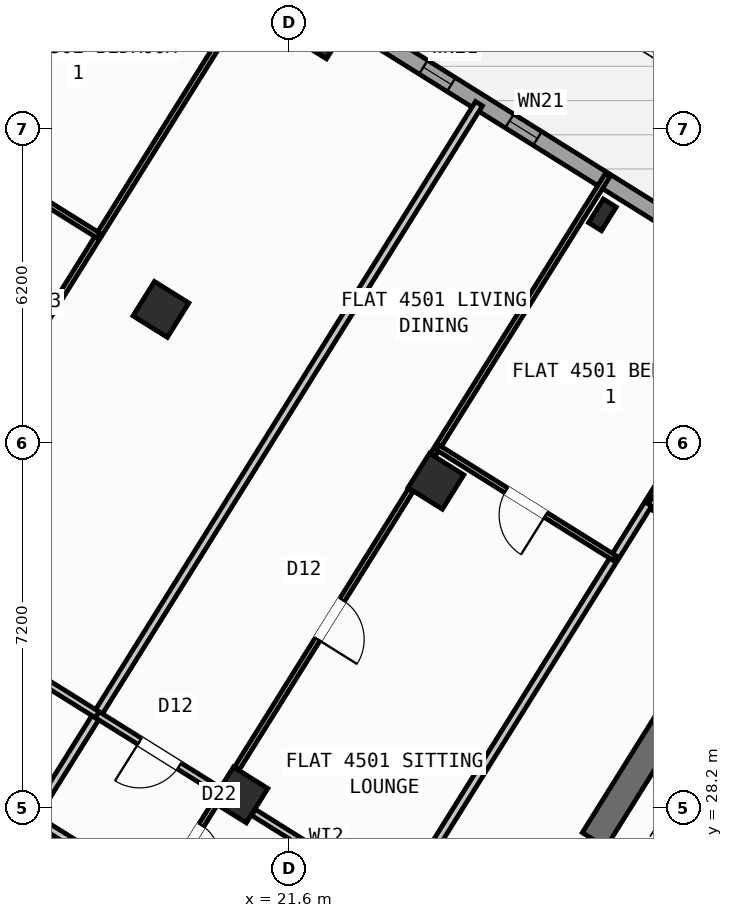
"""IFC4 building model, lengths in metres.
Left out: names, types, materials, properties, quantities, classifications, styles, units other than length and angle.
Written with IfcOpenShell. Run it as: python <this file> out.ifc"""

import sys

from ifc_helpers import new_model, si_unit, direction, frame, frame_2d, origin, origin_2d, place, context, subcontext, project, spatial, rectangle, hollow_rectangle, i_section, extrude, source, transform, mapped, element, fill, save


model = new_model("IFC4")
c1 = context("Model", 3, precision=1e-05, world=origin(), true_north=direction((0.0, 1.0)))
c2 = subcontext(c1, "Body", "Model", "MODEL_VIEW")
j1 = project(units=[si_unit("LENGTHUNIT", "METRE"), si_unit("PLANEANGLEUNIT", "RADIAN")], contexts=[c1])
p1 = place(None, origin())
s1 = spatial("IfcSite", under=j1, at=p1, CompositionType="ELEMENT")
p2 = place(p1, origin())
s2 = spatial("IfcBuilding", under=s1, at=p2, CompositionType="ELEMENT")
p3 = place(p2, frame((0.0, 0.0, 179.4)))
s3 = spatial("IfcBuildingStorey", under=s2, at=p3, CompositionType="ELEMENT", Elevation=179.4)
p4 = place(p3, frame((29.517, 30.594, 0.0), z_axis=(0.0, 0.0, 1.0), x_axis=(-0.529906864564, -0.848055844204, 0.0)))
e1 = element("IfcWall", 1, at=p4, inside=s3, PredefinedType="SHEAR", context=c2, shape_type="SweptSolid", body=[
    extrude(rectangle(XDim=3.575, YDim=0.55, at=frame_2d((1.788, 0.0))), origin(), (0.0, 0.0, 1.0), 4.55),
])
m1 = source(origin(), c2, "Body", "SweptSolid", [
    extrude(i_section(OverallWidth=0.3, OverallDepth=0.55, WebThickness=0.015, FlangeThickness=0.029, at=origin_2d()), origin(), (0.0, 0.0, 1.0), 4.8),
])
p5 = place(p3, frame((27.786, 39.901, 0.0), z_axis=(0.0, 0.0, 1.0), x_axis=(-0.848048096156, 0.529919264233, 0.0)))
e2 = element("IfcColumn", 2, at=p5, inside=s3, PredefinedType="COLUMN", context=c2, shape_type="MappedRepresentation", body=[
    mapped(m1, transform((0.0, 0.0, 0.0), scale=1.0)),
])
m2 = source(origin(), c2, "Body", "SweptSolid", [
    extrude(hollow_rectangle(XDim=0.8, YDim=0.8, WallThickness=0.032, at=origin_2d()), origin(), (0.0, 0.0, 1.0), 4.8),
])
for number, where, z_axis, x_axis in (
    (3, (24.5, 34.643, 0.0), (0.0, 0.0, 1.0), (-0.848, 0.53, 0.0)),
    (4, (20.632, 28.452, 0.0), (0.0, 0.0, 1.0), (-0.848, 0.53, 0.0)),
):
    element("IfcColumn", number, at=place(p3, frame(where, z_axis=z_axis, x_axis=x_axis)), inside=s3, PredefinedType="COLUMN", context=c2, shape_type="MappedRepresentation", body=[
        mapped(m2, transform((0.0, 0.0, 0.0), scale=1.0)),
    ])
p6 = place(p3, frame((22.358, 43.292, 0.0), z_axis=(0.0, 0.0, 1.0), x_axis=(-0.848048096156, 0.529919264233, 0.0)))
e5 = element("IfcColumn", 5, at=p6, inside=s3, PredefinedType="COLUMN", context=c2, shape_type="MappedRepresentation", body=[
    mapped(m1, transform((0.0, 0.0, 0.0), scale=1.0)),
])
p7 = place(p3, frame((19.073, 38.034, 0.0), z_axis=(0.0, 0.0, 1.0), x_axis=(-0.848048096156, 0.529919264233, 0.0)))
e6 = element("IfcColumn", 6, at=p7, inside=s3, PredefinedType="COLUMN", context=c2, shape_type="MappedRepresentation", body=[
    mapped(m2, transform((0.0, 0.0, 0.0), scale=1.0)),
])
p8 = place(p3, frame((31.76, 12.183, 0.0), z_axis=(0.0, 0.0, 1.0), x_axis=(-0.848047074256, 0.529920899612, 0.0)))
e7 = element("IfcWall", 7, at=p8, inside=s3, PredefinedType="STANDARD", context=c2, shape_type="SweptSolid", body=[
    extrude(rectangle(XDim=30.652, YDim=0.32, at=frame_2d((15.326, 0.0))), origin(), (0.0, 0.0, 1.0), 4.55),
])
p9 = place(p8, frame((21.52, 0.0, 0.0)))
e8 = element("IfcOpeningElement", 8, at=p9, cuts=e7, PredefinedType="OPENING", context=c2, shape_type="SweptSolid", body=[
    extrude(rectangle(XDim=1.2, YDim=2.15, at=frame_2d((0.6, 1.075))), frame((0.0, 0.17, 0.0), z_axis=(0.0, -1.0, 0.0), x_axis=(1.0, 0.0, 0.0)), (0.0, 0.0, 1.0), 0.34),
])
p10 = place(p8, frame((14.878, 0.0, 0.0)))
e9 = element("IfcOpeningElement", 9, at=p10, cuts=e7, PredefinedType="OPENING", context=c2, shape_type="SweptSolid", body=[
    extrude(rectangle(XDim=1.5, YDim=2.25, at=frame_2d((0.75, 1.125))), frame((0.0, 0.17, 0.0), z_axis=(0.0, -1.0, 0.0), x_axis=(1.0, 0.0, 0.0)), (0.0, 0.0, 1.0), 0.34),
])
p11 = place(p8, frame((1.865, 0.0, 0.75)))
e10 = element("IfcOpeningElement", 10, at=p11, cuts=e7, PredefinedType="OPENING", context=c2, shape_type="SweptSolid", body=[
    extrude(rectangle(XDim=2.4, YDim=1.6, at=frame_2d((1.2, 0.8))), frame((0.0, 0.17, 0.0), z_axis=(0.0, -1.0, 0.0), x_axis=(1.0, 0.0, 0.0)), (0.0, 0.0, 1.0), 0.34),
])
p12 = place(p8, frame((7.094, 0.0, 0.75)))
e11 = element("IfcOpeningElement", 11, at=p12, cuts=e7, PredefinedType="OPENING", context=c2, shape_type="SweptSolid", body=[
    extrude(rectangle(XDim=2.4, YDim=1.6, at=frame_2d((1.2, 0.8))), frame((0.0, 0.17, 0.0), z_axis=(0.0, -1.0, 0.0), x_axis=(1.0, 0.0, 0.0)), (0.0, 0.0, 1.0), 0.34),
])
p13 = place(p8, frame((19.404, 0.0, 0.95)))
e12 = element("IfcOpeningElement", 12, at=p13, cuts=e7, PredefinedType="OPENING", context=c2, shape_type="SweptSolid", body=[
    extrude(rectangle(XDim=1.2, YDim=1.4, at=frame_2d((0.6, 0.7))), frame((0.0, 0.17, 0.0), z_axis=(0.0, -1.0, 0.0), x_axis=(1.0, 0.0, 0.0)), (0.0, 0.0, 1.0), 0.34),
])
p14 = place(p8, frame((26.458, 0.0, 0.75)))
e13 = element("IfcOpeningElement", 13, at=p14, cuts=e7, PredefinedType="OPENING", context=c2, shape_type="SweptSolid", body=[
    extrude(rectangle(XDim=2.4, YDim=1.6, at=frame_2d((1.2, 0.8))), frame((0.0, 0.17, 0.0), z_axis=(0.0, -1.0, 0.0), x_axis=(1.0, 0.0, 0.0)), (0.0, 0.0, 1.0), 0.34),
])
p15 = place(p3, frame((5.7, 28.71, 0.0), z_axis=(0.0, 0.0, 1.0), x_axis=(0.529923711467, 0.8480453172, 0.0)))
e14 = element("IfcWall", 14, at=p15, inside=s3, PredefinedType="STANDARD", context=c2, shape_type="SweptSolid", body=[
    extrude(rectangle(XDim=21.587, YDim=0.32, at=frame_2d((10.794, 0.0))), origin(), (0.0, 0.0, 1.0), 4.025),
])
p16 = place(p15, frame((10.127, 0.0, 0.75)))
e15 = element("IfcOpeningElement", 15, at=p16, cuts=e14, PredefinedType="OPENING", context=c2, shape_type="SweptSolid", body=[
    extrude(rectangle(XDim=2.4, YDim=1.6, at=frame_2d((1.2, 0.8))), frame((0.0, 0.17, 0.0), z_axis=(0.0, -1.0, 0.0), x_axis=(1.0, 0.0, 0.0)), (0.0, 0.0, 1.0), 0.34),
])
p17 = place(p3, frame((17.424, 47.083, 0.0), z_axis=(0.0, 0.0, 1.0), x_axis=(0.848049927979, -0.529916332693, 0.0)))
e16 = element("IfcWall", 16, at=p17, inside=s3, PredefinedType="STANDARD", context=c2, shape_type="SweptSolid", body=[
    extrude(rectangle(XDim=29.223, YDim=0.32, at=frame_2d((14.612, 0.0))), origin(), (0.0, 0.0, 1.0), 4.55),
])
p18 = place(p17, frame((2.745, 0.0, 0.0)))
e17 = element("IfcOpeningElement", 17, at=p18, cuts=e16, PredefinedType="OPENING", context=c2, shape_type="SweptSolid", body=[
    extrude(rectangle(XDim=1.05, YDim=2.15, at=frame_2d((0.525, 1.075))), frame((0.0, 0.17, 0.0), z_axis=(0.0, -1.0, 0.0), x_axis=(1.0, 0.0, 0.0)), (0.0, 0.0, 1.0), 0.34),
])
p19 = place(p17, frame((21.926, 0.0, 0.75)))
e18 = element("IfcOpeningElement", 18, at=p19, cuts=e16, PredefinedType="OPENING", context=c2, shape_type="SweptSolid", body=[
    extrude(rectangle(XDim=2.4, YDim=1.6, at=frame_2d((1.2, 0.8))), frame((0.0, 0.17, 0.0), z_axis=(0.0, -1.0, 0.0), x_axis=(1.0, 0.0, 0.0)), (0.0, 0.0, 1.0), 0.34),
])
p20 = place(p17, frame((26.934, 0.0, 0.95)))
e19 = element("IfcOpeningElement", 19, at=p20, cuts=e16, PredefinedType="OPENING", context=c2, shape_type="SweptSolid", body=[
    extrude(rectangle(XDim=1.2, YDim=1.4, at=frame_2d((0.6, 0.7))), frame((0.0, 0.17, 0.0), z_axis=(0.0, -1.0, 0.0), x_axis=(1.0, 0.0, 0.0)), (0.0, 0.0, 1.0), 0.34),
])
p21 = place(p17, frame((10.057, 0.0, 1.0)))
e20 = element("IfcOpeningElement", 20, at=p21, cuts=e16, PredefinedType="OPENING", context=c2, shape_type="SweptSolid", body=[
    extrude(rectangle(XDim=0.65, YDim=1.15, at=frame_2d((0.325, 0.575))), frame((0.0, 0.17, 0.0), z_axis=(0.0, -1.0, 0.0), x_axis=(1.0, 0.0, 0.0)), (0.0, 0.0, 1.0), 0.34),
])
p22 = place(p17, frame((14.636, 0.0, 1.0)))
e21 = element("IfcOpeningElement", 21, at=p22, cuts=e16, PredefinedType="OPENING", context=c2, shape_type="SweptSolid", body=[
    extrude(rectangle(XDim=0.9, YDim=1.25, at=frame_2d((0.45, 0.625))), frame((0.0, 0.17, 0.0), z_axis=(0.0, -1.0, 0.0), x_axis=(1.0, 0.0, 0.0)), (0.0, 0.0, 1.0), 0.34),
])
p23 = place(p17, frame((8.052, 0.0, 1.0)))
e22 = element("IfcOpeningElement", 22, at=p23, cuts=e16, PredefinedType="OPENING", context=c2, shape_type="SweptSolid", body=[
    extrude(rectangle(XDim=0.65, YDim=1.15, at=frame_2d((0.325, 0.575))), frame((0.0, 0.17, 0.0), z_axis=(0.0, -1.0, 0.0), x_axis=(1.0, 0.0, 0.0)), (0.0, 0.0, 1.0), 0.34),
])
p24 = place(p3, frame((30.914, 32.829, 0.0), z_axis=(0.0, 0.0, 1.0), x_axis=(-0.848008813643, 0.529982124211, 0.0)))
e23 = element("IfcWall", 23, at=p24, inside=s3, PredefinedType="PARTITIONING", context=c2, shape_type="SweptSolid", body=[
    extrude(rectangle(XDim=2.61, YDim=0.16, at=frame_2d((1.305, 0.0))), origin(), (0.0, 0.0, 1.0), 4.54),
])
p25 = place(p3, frame((31.239, 38.274, 0.0), z_axis=(0.0, 0.0, 1.0), x_axis=(-0.529921796515, -0.848046513806, 0.0)))
e24 = element("IfcWall", 24, at=p25, inside=s3, PredefinedType="PARTITIONING", context=c2, shape_type="SweptSolid", body=[
    extrude(rectangle(XDim=16.5, YDim=0.16, at=frame_2d((8.25, 0.0))), origin(), (0.0, 0.0, 1.0), 4.54),
])
p26 = place(p3, frame((22.495, 24.281, 0.0), z_axis=(0.0, 0.0, 1.0), x_axis=(-0.848052408131, 0.529912363569, 0.0)))
e25 = element("IfcWall", 25, at=p26, inside=s3, PredefinedType="PARTITIONING", context=c2, shape_type="SweptSolid", body=[
    extrude(rectangle(XDim=16.73, YDim=0.16, at=frame_2d((8.365, 0.0))), origin(), (0.0, 0.0, 1.0), 4.54),
])
p27 = place(p26, frame((5.068, 0.0, 0.0)))
e26 = element("IfcOpeningElement", 26, at=p27, cuts=e25, PredefinedType="OPENING", context=c2, shape_type="SweptSolid", body=[
    extrude(rectangle(XDim=1.0, YDim=2.1, at=frame_2d((0.5, 1.05))), frame((0.0, 0.09, 0.0), z_axis=(0.0, -1.0, 0.0), x_axis=(1.0, 0.0, 0.0)), (0.0, 0.0, 1.0), 0.18),
])
p28 = place(p26, frame((9.011, 0.0, 0.0)))
e27 = element("IfcOpeningElement", 27, at=p28, cuts=e25, PredefinedType="OPENING", context=c2, shape_type="SweptSolid", body=[
    extrude(rectangle(XDim=1.0, YDim=2.1, at=frame_2d((0.5, 1.05))), frame((0.0, 0.09, 0.0), z_axis=(0.0, -1.0, 0.0), x_axis=(1.0, 0.0, 0.0)), (0.0, 0.0, 1.0), 0.18),
])
p29 = place(p3, frame((21.329, 22.416, 0.0), z_axis=(0.0, 0.0, 1.0), x_axis=(-0.848052408131, 0.529912363569, 0.0)))
e28 = element("IfcWall", 28, at=p29, inside=s3, PredefinedType="PARTITIONING", context=c2, shape_type="SweptSolid", body=[
    extrude(rectangle(XDim=16.73, YDim=0.16, at=frame_2d((8.365, 0.0))), origin(), (0.0, 0.0, 1.0), 4.54),
])
p30 = place(p29, frame((1.505, 0.0, 0.0)))
e29 = element("IfcOpeningElement", 29, at=p30, cuts=e28, PredefinedType="OPENING", context=c2, shape_type="SweptSolid", body=[
    extrude(rectangle(XDim=1.0, YDim=2.1, at=frame_2d((0.5, 1.05))), frame((0.0, 0.09, 0.0), z_axis=(0.0, -1.0, 0.0), x_axis=(1.0, 0.0, 0.0)), (0.0, 0.0, 1.0), 0.18),
])
p31 = place(p29, frame((6.435, 0.0, 0.0)))
e30 = element("IfcOpeningElement", 30, at=p31, cuts=e28, PredefinedType="OPENING", context=c2, shape_type="SweptSolid", body=[
    extrude(rectangle(XDim=1.0, YDim=2.1, at=frame_2d((0.5, 1.05))), frame((0.0, 0.09, 0.0), z_axis=(0.0, -1.0, 0.0), x_axis=(1.0, 0.0, 0.0)), (0.0, 0.0, 1.0), 0.18),
])
p32 = place(p29, frame((12.784, 0.0, 0.0)))
e31 = element("IfcOpeningElement", 31, at=p32, cuts=e28, PredefinedType="OPENING", context=c2, shape_type="SweptSolid", body=[
    extrude(rectangle(XDim=1.0, YDim=2.1, at=frame_2d((0.5, 1.05))), frame((0.0, 0.09, 0.0), z_axis=(0.0, -1.0, 0.0), x_axis=(1.0, 0.0, 0.0)), (0.0, 0.0, 1.0), 0.18),
])
p33 = place(p3, frame((25.351, 42.095, 0.0), z_axis=(0.0, 0.0, 1.0), x_axis=(-0.529926315456, -0.848043690023, 0.0)))
e32 = element("IfcWall", 32, at=p33, inside=s3, PredefinedType="PARTITIONING", context=c2, shape_type="SweptSolid", body=[
    extrude(rectangle(XDim=16.62, YDim=0.16, at=frame_2d((8.31, 0.0))), origin(), (0.0, 0.0, 1.0), 4.54),
])
p34 = place(p3, frame((27.889, 40.685, 0.0), z_axis=(0.0, 0.0, 1.0), x_axis=(-0.529924752708, -0.848044666552, 0.0)))
e33 = element("IfcWall", 33, at=p34, inside=s3, PredefinedType="PARTITIONING", context=c2, shape_type="SweptSolid", body=[
    extrude(rectangle(XDim=6.508, YDim=0.11, at=frame_2d((3.254, 0.0))), origin(), (0.0, 0.0, 1.0), 4.54),
])
p35 = place(p3, frame((24.004, 34.467, 0.0), z_axis=(0.0, 0.0, 1.0), x_axis=(-0.529907440938, -0.848055484057, 0.0)))
e34 = element("IfcWall", 34, at=p35, inside=s3, PredefinedType="PARTITIONING", context=c2, shape_type="SweptSolid", body=[
    extrude(rectangle(XDim=6.476, YDim=0.11, at=frame_2d((3.238, 0.0))), origin(), (0.0, 0.0, 1.0), 4.54),
])
p36 = place(p35, frame((2.552, 0.0, 0.0)))
e35 = element("IfcOpeningElement", 35, at=p36, cuts=e34, PredefinedType="OPENING", context=c2, shape_type="SweptSolid", body=[
    extrude(rectangle(XDim=0.92, YDim=2.08, at=frame_2d((0.46, 1.04))), frame((0.0, 0.065, 0.0), z_axis=(0.0, -1.0, 0.0), x_axis=(1.0, 0.0, 0.0)), (0.0, 0.0, 1.0), 0.13),
])
p37 = place(p3, frame((20.135, 28.277, 0.0), z_axis=(0.0, 0.0, 1.0), x_axis=(-0.529844966244, -0.848094518167, 0.0)))
e36 = element("IfcWall", 36, at=p37, inside=s3, PredefinedType="PARTITIONING", context=c2, shape_type="SweptSolid", body=[
    extrude(rectangle(XDim=2.138, YDim=0.11, at=frame_2d((1.069, 0.0))), origin(), (0.0, 0.0, 1.0), 4.54),
])
p38 = place(p37, frame((0.498, 0.0, 0.0)))
e37 = element("IfcOpeningElement", 37, at=p38, cuts=e36, PredefinedType="OPENING", context=c2, shape_type="SweptSolid", body=[
    extrude(rectangle(XDim=0.78, YDim=2.05, at=frame_2d((0.39, 1.025))), frame((0.0, 0.065, 0.0), z_axis=(0.0, -1.0, 0.0), x_axis=(1.0, 0.0, 0.0)), (0.0, 0.0, 1.0), 0.13),
])
p39 = place(p3, frame((20.203, 28.543, 0.0), z_axis=(0.0, 0.0, 1.0), x_axis=(-0.848066485351, 0.529889834233, 0.0)))
e38 = element("IfcWall", 38, at=p39, inside=s3, PredefinedType="PLUMBINGWALL", context=c2, shape_type="SweptSolid", body=[
    extrude(rectangle(XDim=2.816, YDim=0.14, at=frame_2d((1.408, 0.0))), origin(), (0.0, 0.0, 1.0), 4.025),
])
p40 = place(p39, frame((0.906, 0.0, 0.0)))
e39 = element("IfcOpeningElement", 39, at=p40, cuts=e38, PredefinedType="OPENING", context=c2, shape_type="SweptSolid", body=[
    extrude(rectangle(XDim=0.92, YDim=2.08, at=frame_2d((0.46, 1.04))), frame((0.0, 0.08, 0.0), z_axis=(0.0, -1.0, 0.0), x_axis=(1.0, 0.0, 0.0)), (0.0, 0.0, 1.0), 0.16),
])
p41 = place(p3, frame((23.767, 26.316, 0.0), z_axis=(0.0, 0.0, 1.0), x_axis=(-0.848055143312, 0.529907986259, 0.0)))
e40 = element("IfcWall", 40, at=p41, inside=s3, PredefinedType="PLUMBINGWALL", context=c2, shape_type="SweptSolid", body=[
    extrude(rectangle(XDim=3.378, YDim=0.14, at=frame_2d((1.689, 0.0))), origin(), (0.0, 0.0, 1.0), 4.025),
])
p42 = place(p3, frame((28.023, 33.129, 0.0), z_axis=(0.0, 0.0, 1.0), x_axis=(-0.848051592054, 0.529913669587, 0.0)))
e41 = element("IfcWall", 41, at=p42, inside=s3, PredefinedType="PARTITIONING", context=c2, shape_type="SweptSolid", body=[
    extrude(rectangle(XDim=4.118, YDim=0.11, at=frame_2d((2.059, 0.0))), origin(), (0.0, 0.0, 1.0), 4.54),
])
p43 = place(p42, frame((1.599, 0.0, 0.0)))
e42 = element("IfcOpeningElement", 42, at=p43, cuts=e41, PredefinedType="OPENING", context=c2, shape_type="SweptSolid", body=[
    extrude(rectangle(XDim=0.92, YDim=2.08, at=frame_2d((0.46, 1.04))), frame((0.0, 0.065, 0.0), z_axis=(0.0, -1.0, 0.0), x_axis=(1.0, 0.0, 0.0)), (0.0, 0.0, 1.0), 0.13),
])
p44 = place(p3, frame((21.202, 44.864, 0.0), z_axis=(0.0, 0.0, 1.0), x_axis=(-0.529920421309, -0.848047373134, 0.0)))
e43 = element("IfcWall", 43, at=p44, inside=s3, PredefinedType="PARTITIONING", context=c2, shape_type="SweptSolid", body=[
    extrude(rectangle(XDim=16.77, YDim=0.11, at=frame_2d((8.385, 0.0))), origin(), (0.0, 0.0, 1.0), 4.54),
])
p45 = place(p44, frame((15.13, 0.0, 0.0)))
e44 = element("IfcOpeningElement", 44, at=p45, cuts=e43, PredefinedType="OPENING", context=c2, shape_type="SweptSolid", body=[
    extrude(rectangle(XDim=0.78, YDim=2.05, at=frame_2d((0.39, 1.025))), frame((0.0, 0.065, 0.0), z_axis=(0.0, -1.0, 0.0), x_axis=(1.0, 0.0, 0.0)), (0.0, 0.0, 1.0), 0.13),
])
p46 = place(p44, frame((9.884, 0.0, 0.0)))
e45 = element("IfcOpeningElement", 45, at=p46, cuts=e43, PredefinedType="OPENING", context=c2, shape_type="SweptSolid", body=[
    extrude(rectangle(XDim=0.92, YDim=2.08, at=frame_2d((0.46, 1.04))), frame((0.0, 0.065, 0.0), z_axis=(0.0, -1.0, 0.0), x_axis=(1.0, 0.0, 0.0)), (0.0, 0.0, 1.0), 0.13),
])
p47 = place(p3, frame((17.815, 30.035, 0.0), z_axis=(0.0, 0.0, 1.0), x_axis=(-0.848033088468, 0.529943280798, 0.0)))
e46 = element("IfcWall", 46, at=p47, inside=s3, PredefinedType="PLUMBINGWALL", context=c2, shape_type="SweptSolid", body=[
    extrude(rectangle(XDim=2.76, YDim=0.14, at=frame_2d((1.38, 0.0))), origin(), (0.0, 0.0, 1.0), 4.025),
])
p48 = place(p47, frame((1.333, 0.0, 0.0)))
e47 = element("IfcOpeningElement", 47, at=p48, cuts=e46, PredefinedType="OPENING", context=c2, shape_type="SweptSolid", body=[
    extrude(rectangle(XDim=0.92, YDim=2.08, at=frame_2d((0.46, 1.04))), frame((0.0, 0.08, 0.0), z_axis=(0.0, -1.0, 0.0), x_axis=(1.0, 0.0, 0.0)), (0.0, 0.0, 1.0), 0.16),
])
p49 = place(p3, frame((17.844, 39.49, 0.0), z_axis=(0.0, 0.0, 1.0), x_axis=(-0.848042018142, 0.529928990966, 0.0)))
e48 = element("IfcWall", 48, at=p49, inside=s3, PredefinedType="PARTITIONING", context=c2, shape_type="SweptSolid", body=[
    extrude(rectangle(XDim=4.706, YDim=0.11, at=frame_2d((2.353, 0.0))), origin(), (0.0, 0.0, 1.0), 4.54),
])
p50 = place(p49, frame((1.893, 0.0, 0.0)))
e49 = element("IfcOpeningElement", 49, at=p50, cuts=e48, PredefinedType="OPENING", context=c2, shape_type="SweptSolid", body=[
    extrude(rectangle(XDim=0.92, YDim=2.08, at=frame_2d((0.46, 1.04))), frame((0.0, 0.065, 0.0), z_axis=(0.0, -1.0, 0.0), x_axis=(1.0, 0.0, 0.0)), (0.0, 0.0, 1.0), 0.13),
])
p51 = place(p3, frame((41.936, 26.012, 0.0), z_axis=(0.0, 0.0, 1.0), x_axis=(-0.848051154596, 0.529914369676, 0.0)))
e50 = element("IfcWall", 50, at=p51, inside=s3, PredefinedType="PARTITIONING", context=c2, shape_type="SweptSolid", body=[
    extrude(rectangle(XDim=15.57, YDim=0.16, at=frame_2d((7.785, 0.0))), origin(), (0.0, 0.0, 1.0), 4.54),
])
p52 = place(p51, frame((4.1, 0.0, 0.0)))
e51 = element("IfcOpeningElement", 51, at=p52, cuts=e50, PredefinedType="OPENING", context=c2, shape_type="SweptSolid", body=[
    extrude(rectangle(XDim=0.96, YDim=2.08, at=frame_2d((0.48, 1.04))), frame((0.0, 0.09, 0.0), z_axis=(0.0, -1.0, 0.0), x_axis=(1.0, 0.0, 0.0)), (0.0, 0.0, 1.0), 0.18),
])
p53 = place(p51, frame((8.2, 0.0, 0.0)))
e52 = element("IfcOpeningElement", 52, at=p53, cuts=e50, PredefinedType="OPENING", context=c2, shape_type="SweptSolid", body=[
    extrude(rectangle(XDim=1.7, YDim=2.2, at=frame_2d((0.85, 1.1))), frame((0.0, 0.09, 0.0), z_axis=(0.0, -1.0, 0.0), x_axis=(1.0, 0.0, 0.0)), (0.0, 0.0, 1.0), 0.18),
])
m3 = source(origin(), c2, "Body", "SweptSolid", [
    extrude(rectangle(XDim=0.65, YDim=1.15, at=frame_2d((0.325, 0.575))), frame((0.0, 0.03, 0.0), z_axis=(0.0, -1.0, 0.0), x_axis=(1.0, 0.0, 0.0)), (0.0, 0.0, 1.0), 0.06),
])
p54 = place(p21, origin())
e53 = element("IfcWindow", 53, at=p54, inside=s3, PartitioningType="SINGLE_PANEL", PredefinedType="WINDOW", context=c2, shape_type="MappedRepresentation", body=[
    mapped(m3, transform((0.0, 0.0, 0.0), scale=1.0)),
])
fill(e20, e53)
p55 = place(p23, origin())
e54 = element("IfcWindow", 54, at=p55, inside=s3, PartitioningType="SINGLE_PANEL", PredefinedType="WINDOW", context=c2, shape_type="MappedRepresentation", body=[
    mapped(m3, transform((0.0, 0.0, 0.0), scale=1.0)),
])
fill(e22, e54)
m4 = source(origin(), c2, "Body", "SweptSolid", [
    extrude(rectangle(XDim=0.92, YDim=2.08, at=frame_2d((0.46, 1.04))), frame((0.0, 0.025, 0.0), z_axis=(0.0, -1.0, 0.0), x_axis=(1.0, 0.0, 0.0)), (0.0, 0.0, 1.0), 0.05),
])
p56 = place(p40, origin())
e55 = element("IfcDoor", 55, at=p56, inside=s3, OperationType="SINGLE_SWING_RIGHT", PredefinedType="DOOR", context=c2, shape_type="MappedRepresentation", body=[
    mapped(m4, transform((0.0, 0.0, 0.0), scale=1.0)),
])
fill(e39, e55)
m5 = source(origin(), c2, "Body", "SweptSolid", [
    extrude(rectangle(XDim=0.78, YDim=2.05, at=frame_2d((0.39, 1.025))), frame((0.0, 0.025, 0.0), z_axis=(0.0, -1.0, 0.0), x_axis=(1.0, 0.0, 0.0)), (0.0, 0.0, 1.0), 0.05),
])
p57 = place(p38, origin())
e56 = element("IfcDoor", 56, at=p57, inside=s3, OperationType="SINGLE_SWING_RIGHT", PredefinedType="DOOR", context=c2, shape_type="MappedRepresentation", body=[
    mapped(m5, transform((0.0, 0.0, 0.0), scale=1.0)),
])
fill(e37, e56)
p58 = place(p36, origin())
e57 = element("IfcDoor", 57, at=p58, inside=s3, OperationType="SINGLE_SWING_RIGHT", PredefinedType="DOOR", context=c2, shape_type="MappedRepresentation", body=[
    mapped(m4, transform((0.0, 0.0, 0.0), scale=1.0)),
])
fill(e35, e57)
p59 = place(p43, origin())
e58 = element("IfcDoor", 58, at=p59, inside=s3, OperationType="SINGLE_SWING_LEFT", PredefinedType="DOOR", context=c2, shape_type="MappedRepresentation", body=[
    mapped(m4, transform((0.0, 0.0, 0.0), scale=1.0)),
])
fill(e42, e58)
save(model, sys.argv[1])
